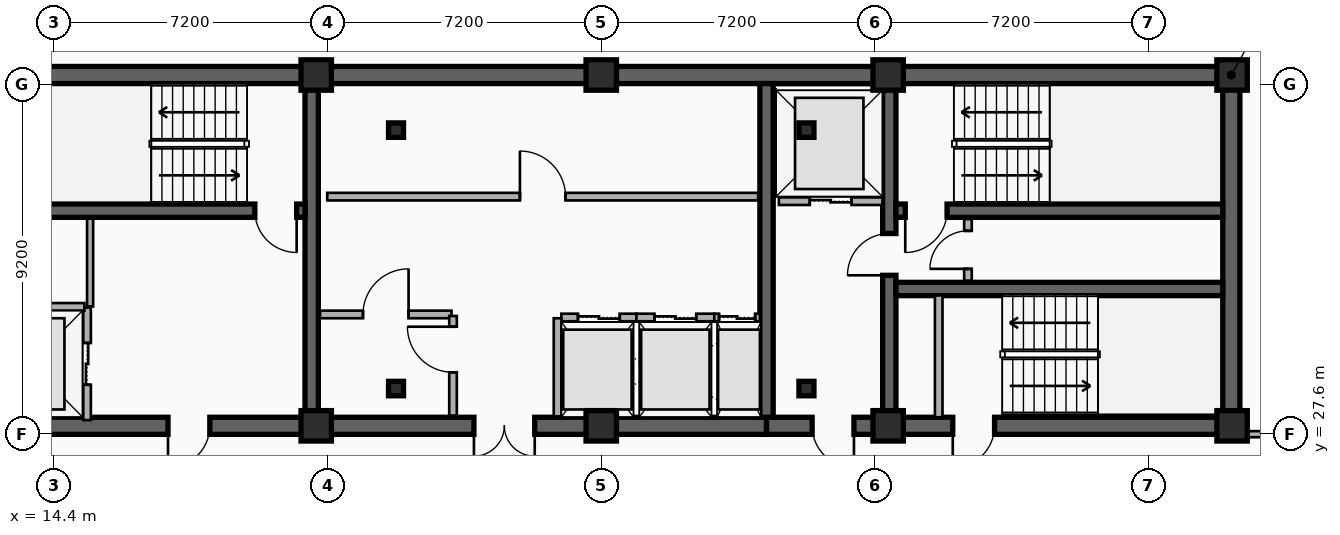
"""IFC4 building model, lengths in metres.
Left out: names, types, materials, properties, quantities, classifications, styles, units other than length and angle.
Written with IfcOpenShell. Run it as: python <this file> out.ifc"""

import sys

from ifc_helpers import new_model, si_unit, direction, frame, frame_2d, origin, origin_2d, place, context, subcontext, project, spatial, rectangle, i_section, extrude, element, fill, save


model = new_model("IFC4")
c1 = context("Model", 3, precision=1e-05, world=origin(), true_north=direction((0.0, 1.0)))
c2 = subcontext(c1, "Body", "Model", "MODEL_VIEW")
j1 = project(units=[si_unit("LENGTHUNIT", "METRE"), si_unit("PLANEANGLEUNIT", "RADIAN")], contexts=[c1])
p1 = place(None, origin())
s1 = spatial("IfcSite", under=j1, at=p1, CompositionType="ELEMENT")
p2 = place(p1, origin())
s2 = spatial("IfcBuilding", under=s1, at=p2, CompositionType="ELEMENT")
p3 = place(p2, frame((0.0, 0.0, 247.3)))
s3 = spatial("IfcBuildingStorey", under=s2, at=p3, CompositionType="ELEMENT", Elevation=247.3)
p4 = place(p3, frame((12.15, 37.05, 0.0), z_axis=(0.0, 0.0, 1.0), x_axis=(1.0, 0.0, 0.0)))
e1 = element("IfcWall", 1, at=p4, inside=s3, PredefinedType="SHEAR", context=c2, shape_type="SweptSolid", body=[
    extrude(rectangle(XDim=33.23, YDim=0.45, at=frame_2d((16.615, 0.0))), origin(), (0.0, 0.0, 1.0), 3.7),
])
p5 = place(p3, frame((21.18, 27.82, 0.0), z_axis=(0.0, 0.0, 1.0), x_axis=(-1.0, 0.0, 0.0)))
e2 = element("IfcWall", 2, at=p5, inside=s3, PredefinedType="SHEAR", context=c2, shape_type="SweptSolid", body=[
    extrude(rectangle(XDim=9.03, YDim=0.45, at=frame_2d((4.515, 0.0))), origin(), (0.0, 0.0, 1.0), 3.7),
])
p6 = place(p5, frame((2.68, 0.0, 0.0)))
e3 = element("IfcOpeningElement", 3, at=p6, cuts=e2, PredefinedType="OPENING", context=c2, shape_type="SweptSolid", body=[
    extrude(rectangle(XDim=1.1, YDim=2.15, at=frame_2d((0.55, 1.075))), frame((0.0, 0.235, 0.0), z_axis=(0.0, -1.0, 0.0), x_axis=(1.0, 0.0, 0.0)), (0.0, 0.0, 1.0), 0.47),
])
p7 = place(p3, frame((33.15, 27.82, 0.0), z_axis=(0.0, 0.0, 1.0), x_axis=(-1.0, 0.0, 0.0)))
e4 = element("IfcWall", 4, at=p7, inside=s3, PredefinedType="SHEAR", context=c2, shape_type="SweptSolid", body=[
    extrude(rectangle(XDim=11.97, YDim=0.45, at=frame_2d((5.985, 0.0))), origin(), (0.0, 0.0, 1.0), 3.7),
])
p8 = place(p7, frame((6.1, 0.0, 0.0)))
e5 = element("IfcOpeningElement", 5, at=p8, cuts=e4, PredefinedType="OPENING", context=c2, shape_type="SweptSolid", body=[
    extrude(rectangle(XDim=1.6, YDim=2.2, at=frame_2d((0.8, 1.1))), frame((0.0, 0.235, 0.0), z_axis=(0.0, -1.0, 0.0), x_axis=(1.0, 0.0, 0.0)), (0.0, 0.0, 1.0), 0.47),
])
p9 = place(p3, frame((45.38, 27.82, 0.0), z_axis=(0.0, 0.0, 1.0), x_axis=(-1.0, 0.0, 0.0)))
e6 = element("IfcWall", 6, at=p9, inside=s3, PredefinedType="SHEAR", context=c2, shape_type="SweptSolid", body=[
    extrude(rectangle(XDim=12.23, YDim=0.45, at=frame_2d((6.115, 0.0))), origin(), (0.0, 0.0, 1.0), 3.7),
])
p10 = place(p9, frame((9.93, 0.0, 0.0)))
e7 = element("IfcOpeningElement", 7, at=p10, cuts=e6, PredefinedType="OPENING", context=c2, shape_type="SweptSolid", body=[
    extrude(rectangle(XDim=1.1, YDim=2.15, at=frame_2d((0.55, 1.075))), frame((0.0, 0.235, 0.0), z_axis=(0.0, -1.0, 0.0), x_axis=(1.0, 0.0, 0.0)), (0.0, 0.0, 1.0), 0.47),
])
p11 = place(p9, frame((6.23, 0.0, 0.0)))
e8 = element("IfcOpeningElement", 8, at=p11, cuts=e6, PredefinedType="OPENING", context=c2, shape_type="SweptSolid", body=[
    extrude(rectangle(XDim=1.1, YDim=2.15, at=frame_2d((0.55, 1.075))), frame((0.0, 0.235, 0.0), z_axis=(0.0, -1.0, 0.0), x_axis=(1.0, 0.0, 0.0)), (0.0, 0.0, 1.0), 0.47),
])
p12 = place(p3, frame((45.38, 28.045, 0.0), z_axis=(0.0, 0.0, 1.0), x_axis=(0.0, 1.0, 0.0)))
e9 = element("IfcWall", 9, at=p12, inside=s3, PredefinedType="SHEAR", context=c2, shape_type="SweptSolid", body=[
    extrude(rectangle(XDim=8.78, YDim=0.45, at=frame_2d((4.39, 0.0))), origin(), (0.0, 0.0, 1.0), 3.7),
])
for number, where, z_axis, x_axis in (
    (10, (21.18, 28.045, 0.0), (0.0, 0.0, 1.0), (0.0, 1.0, 0.0)),
    (11, (33.15, 28.045, 0.0), (0.0, 0.0, 1.0), (0.0, 1.0, 0.0)),
):
    element("IfcWall", number, at=place(p3, frame(where, z_axis=z_axis, x_axis=x_axis)), inside=s3, PredefinedType="SHEAR", context=c2, shape_type="SweptSolid", body=[
        extrude(rectangle(XDim=8.78, YDim=0.35, at=frame_2d((4.39, 0.0))), origin(), (0.0, 0.0, 1.0), 3.7),
    ])
p13 = place(p3, frame((36.38, 28.045, 0.0), z_axis=(0.0, 0.0, 1.0), x_axis=(0.0, 1.0, 0.0)))
e12 = element("IfcWall", 12, at=p13, inside=s3, PredefinedType="SHEAR", context=c2, shape_type="SweptSolid", body=[
    extrude(rectangle(XDim=8.78, YDim=0.35, at=frame_2d((4.39, 0.0))), origin(), (0.0, 0.0, 1.0), 3.7),
])
p14 = place(p13, frame((3.735, 0.0, 0.0)))
e13 = element("IfcOpeningElement", 13, at=p14, cuts=e12, PredefinedType="OPENING", context=c2, shape_type="SweptSolid", body=[
    extrude(rectangle(XDim=1.1, YDim=2.15, at=frame_2d((0.55, 1.075))), frame((0.0, 0.185, 0.0), z_axis=(0.0, -1.0, 0.0), x_axis=(1.0, 0.0, 0.0)), (0.0, 0.0, 1.0), 0.37),
])
p15 = place(p3, frame((21.005, 33.48, 0.0), z_axis=(0.0, 0.0, 1.0), x_axis=(-1.0, 0.0, 0.0)))
e14 = element("IfcWall", 14, at=p15, inside=s3, PredefinedType="SHEAR", context=c2, shape_type="SweptSolid", body=[
    extrude(rectangle(XDim=8.63, YDim=0.35, at=frame_2d((4.315, 0.0))), origin(), (0.0, 0.0, 1.0), 3.7),
])
p16 = place(p15, frame((0.22, 0.0, 0.0)))
e15 = element("IfcOpeningElement", 15, at=p16, cuts=e14, PredefinedType="OPENING", context=c2, shape_type="SweptSolid", body=[
    extrude(rectangle(XDim=1.1, YDim=2.15, at=frame_2d((0.55, 1.075))), frame((0.0, 0.185, 0.0), z_axis=(0.0, -1.0, 0.0), x_axis=(1.0, 0.0, 0.0)), (0.0, 0.0, 1.0), 0.37),
])
p17 = place(p3, frame((45.155, 33.48, 0.0), z_axis=(0.0, 0.0, 1.0), x_axis=(-1.0, 0.0, 0.0)))
e16 = element("IfcWall", 16, at=p17, inside=s3, PredefinedType="SHEAR", context=c2, shape_type="SweptSolid", body=[
    extrude(rectangle(XDim=8.6, YDim=0.35, at=frame_2d((4.3, 0.0))), origin(), (0.0, 0.0, 1.0), 3.7),
])
p18 = place(p17, frame((7.255, 0.0, 0.0)))
e17 = element("IfcOpeningElement", 17, at=p18, cuts=e16, PredefinedType="OPENING", context=c2, shape_type="SweptSolid", body=[
    extrude(rectangle(XDim=1.1, YDim=2.15, at=frame_2d((0.55, 1.075))), frame((0.0, 0.185, 0.0), z_axis=(0.0, -1.0, 0.0), x_axis=(1.0, 0.0, 0.0)), (0.0, 0.0, 1.0), 0.37),
])
p19 = place(p3, frame((36.555, 31.42, 0.0), z_axis=(0.0, 0.0, 1.0), x_axis=(1.0, 0.0, 0.0)))
e18 = element("IfcWall", 18, at=p19, inside=s3, PredefinedType="SHEAR", context=c2, shape_type="SweptSolid", body=[
    extrude(rectangle(XDim=8.6, YDim=0.35, at=frame_2d((4.3, 0.0))), origin(), (0.0, 0.0, 1.0), 3.7),
])
for number, where, z_axis, x_axis in (
    (19, (23.4, 28.8, 0.0), (0.0, 0.0, 1.0), (1.0, 0.0, 0.0)),
    (20, (34.2, 28.8, 0.0), (0.0, 0.0, 1.0), (1.0, 0.0, 0.0)),
    (21, (34.2, 35.6, 0.0), (0.0, 0.0, 1.0), (1.0, 0.0, 0.0)),
    (22, (23.4, 35.6, 0.0), (0.0, 0.0, 1.0), (1.0, 0.0, 0.0)),
):
    element("IfcColumn", number, at=place(p3, frame(where, z_axis=z_axis, x_axis=x_axis)), inside=s3, PredefinedType="COLUMN", context=c2, shape_type="SweptSolid", body=[
        extrude(i_section(OverallWidth=0.395, OverallDepth=0.38, WebThickness=0.019, FlangeThickness=0.03, FilletRadius=0.015, at=origin_2d()), origin(), (0.0, 0.0, 1.0), 3.7),
    ])
for number, where, z_axis, x_axis in (
    (23, (21.3, 27.82, 0.0), (0.0, 0.0, 1.0), (1.0, 0.0, 0.0)),
    (24, (21.3, 37.05, 0.0), (0.0, 0.0, 1.0), (1.0, 0.0, 0.0)),
    (25, (28.8, 27.82, 0.0), (0.0, 0.0, 1.0), (1.0, 0.0, 0.0)),
    (26, (28.8, 37.05, 0.0), (0.0, 0.0, 1.0), (1.0, 0.0, 0.0)),
    (27, (36.35, 27.82, 0.0), (0.0, 0.0, 1.0), (1.0, 0.0, 0.0)),
    (28, (36.35, 37.05, 0.0), (0.0, 0.0, 1.0), (1.0, 0.0, 0.0)),
    (29, (45.4, 27.82, 0.0), (0.0, 0.0, 1.0), (1.0, 0.0, 0.0)),
    (30, (45.4, 37.05, 0.0), (0.0, 0.0, 1.0), (1.0, 0.0, 0.0)),
):
    element("IfcColumn", number, at=place(p3, frame(where, z_axis=z_axis, x_axis=x_axis)), inside=s3, PredefinedType="COLUMN", context=c2, shape_type="SweptSolid", body=[
        extrude(rectangle(XDim=0.8, YDim=0.8, at=origin_2d()), origin(), (0.0, 0.0, 1.0), 3.7),
    ])
p20 = place(p3, frame((15.27, 27.97, 0.0), z_axis=(0.0, 0.0, 1.0), x_axis=(0.0, 1.0, 0.0)))
e31 = element("IfcWall", 31, at=p20, inside=s3, PredefinedType="PARTITIONING", context=c2, shape_type="SweptSolid", body=[
    extrude(rectangle(XDim=2.96, YDim=0.2, at=frame_2d((1.48, 0.0))), origin(), (0.0, 0.0, 1.0), 2.49),
])
p21 = place(p20, frame((0.93, 0.0, 0.0)))
e32 = element("IfcOpeningElement", 32, at=p21, cuts=e31, PredefinedType="OPENING", context=c2, shape_type="SweptSolid", body=[
    extrude(rectangle(XDim=1.1, YDim=2.15, at=frame_2d((0.55, 1.075))), frame((0.0, 0.11, 0.0), z_axis=(0.0, -1.0, 0.0), x_axis=(1.0, 0.0, 0.0)), (0.0, 0.0, 1.0), 0.22),
])
p22 = place(p3, frame((12.45, 30.95, 0.0), z_axis=(0.0, 0.0, 1.0), x_axis=(1.0, 0.0, 0.0)))
e33 = element("IfcWall", 33, at=p22, inside=s3, PredefinedType="PARTITIONING", context=c2, shape_type="SweptSolid", body=[
    extrude(rectangle(XDim=2.75, YDim=0.2, at=frame_2d((1.375, 0.0))), origin(), (0.0, 0.0, 1.0), 2.49),
])
p23 = place(p3, frame((33.475, 33.73, 0.0), z_axis=(0.0, 0.0, 1.0), x_axis=(1.0, 0.0, 0.0)))
e34 = element("IfcWall", 34, at=p23, inside=s3, PredefinedType="PARTITIONING", context=c2, shape_type="SweptSolid", body=[
    extrude(rectangle(XDim=2.725, YDim=0.2, at=frame_2d((1.362, 0.0))), origin(), (0.0, 0.0, 1.0), 2.49),
])
p24 = place(p23, frame((0.812, 0.0, 0.0)))
e35 = element("IfcOpeningElement", 35, at=p24, cuts=e34, PredefinedType="OPENING", context=c2, shape_type="SweptSolid", body=[
    extrude(rectangle(XDim=1.1, YDim=2.15, at=frame_2d((0.55, 1.075))), frame((0.0, 0.11, 0.0), z_axis=(0.0, -1.0, 0.0), x_axis=(1.0, 0.0, 0.0)), (0.0, 0.0, 1.0), 0.22),
])
p25 = place(p3, frame((27.75, 30.67, 0.0), z_axis=(0.0, 0.0, 1.0), x_axis=(1.0, 0.0, 0.0)))
e36 = element("IfcWall", 36, at=p25, inside=s3, PredefinedType="PARTITIONING", context=c2, shape_type="SweptSolid", body=[
    extrude(rectangle(XDim=1.975, YDim=0.2, at=frame_2d((0.988, 0.0))), origin(), (0.0, 0.0, 1.0), 2.49),
])
p26 = place(p25, frame((0.438, 0.0, 0.0)))
e37 = element("IfcOpeningElement", 37, at=p26, cuts=e36, PredefinedType="OPENING", context=c2, shape_type="SweptSolid", body=[
    extrude(rectangle(XDim=1.1, YDim=2.15, at=frame_2d((0.55, 1.075))), frame((0.0, 0.11, 0.0), z_axis=(0.0, -1.0, 0.0), x_axis=(1.0, 0.0, 0.0)), (0.0, 0.0, 1.0), 0.22),
])
p27 = place(p3, frame((27.65, 28.07, 0.0), z_axis=(0.0, 0.0, 1.0), x_axis=(0.0, 1.0, 0.0)))
e38 = element("IfcWall", 38, at=p27, inside=s3, PredefinedType="PARTITIONING", context=c2, shape_type="SweptSolid", body=[
    extrude(rectangle(XDim=2.58, YDim=0.2, at=frame_2d((1.29, 0.0))), origin(), (0.0, 0.0, 1.0), 2.49),
])
p28 = place(p3, frame((29.725, 30.67, 0.0), z_axis=(0.0, 0.0, 1.0), x_axis=(1.0, 0.0, 0.0)))
e39 = element("IfcWall", 39, at=p28, inside=s3, PredefinedType="PARTITIONING", context=c2, shape_type="SweptSolid", body=[
    extrude(rectangle(XDim=2.05, YDim=0.2, at=frame_2d((1.025, 0.0))), origin(), (0.0, 0.0, 1.0), 2.8),
])
p29 = place(p28, frame((0.475, 0.0, 0.0)))
e40 = element("IfcOpeningElement", 40, at=p29, cuts=e39, PredefinedType="OPENING", context=c2, shape_type="SweptSolid", body=[
    extrude(rectangle(XDim=1.1, YDim=2.15, at=frame_2d((0.55, 1.075))), frame((0.0, 0.11, 0.0), z_axis=(0.0, -1.0, 0.0), x_axis=(1.0, 0.0, 0.0)), (0.0, 0.0, 1.0), 0.22),
])
p30 = place(p3, frame((31.775, 30.67, 0.0), z_axis=(0.0, 0.0, 1.0), x_axis=(1.0, 0.0, 0.0)))
e41 = element("IfcWall", 41, at=p30, inside=s3, PredefinedType="PARTITIONING", context=c2, shape_type="SweptSolid", body=[
    extrude(rectangle(XDim=1.2, YDim=0.2, at=frame_2d((0.6, 0.0))), origin(), (0.0, 0.0, 1.0), 2.8),
])
p31 = place(p30, frame((0.125, 0.0, 0.0)))
e42 = element("IfcOpeningElement", 42, at=p31, cuts=e41, PredefinedType="OPENING", context=c2, shape_type="SweptSolid", body=[
    extrude(rectangle(XDim=0.95, YDim=2.15, at=frame_2d((0.475, 1.075))), frame((0.0, 0.11, 0.0), z_axis=(0.0, -1.0, 0.0), x_axis=(1.0, 0.0, 0.0)), (0.0, 0.0, 1.0), 0.22),
])
p32 = place(p3, frame((37.68, 28.045, 0.0), z_axis=(0.0, 0.0, 1.0), x_axis=(0.0, 1.0, 0.0)))
e43 = element("IfcWall", 43, at=p32, inside=s3, PredefinedType="PARTITIONING", context=c2, shape_type="SweptSolid", body=[
    extrude(rectangle(XDim=3.205, YDim=0.2, at=frame_2d((1.603, 0.0))), origin(), (0.0, 0.0, 1.0), 2.8),
])
p33 = place(p3, frame((38.45, 31.64, 0.0), z_axis=(0.0, 0.0, 1.0), x_axis=(0.0, 1.0, 0.0)))
e44 = element("IfcWall", 44, at=p33, inside=s3, PredefinedType="PARTITIONING", context=c2, shape_type="SweptSolid", body=[
    extrude(rectangle(XDim=1.62, YDim=0.2, at=frame_2d((0.81, 0.0))), origin(), (0.0, 0.0, 1.0), 3.42),
])
p34 = place(p33, frame((0.31, 0.0, 0.0)))
e45 = element("IfcOpeningElement", 45, at=p34, cuts=e44, PredefinedType="OPENING", context=c2, shape_type="SweptSolid", body=[
    extrude(rectangle(XDim=1.0, YDim=2.15, at=frame_2d((0.5, 1.075))), frame((0.0, 0.11, 0.0), z_axis=(0.0, -1.0, 0.0), x_axis=(1.0, 0.0, 0.0)), (0.0, 0.0, 1.0), 0.22),
])
p35 = place(p3, frame((21.4, 30.75, 0.0), z_axis=(0.0, 0.0, 1.0), x_axis=(1.0, 0.0, 0.0)))
e46 = element("IfcWall", 46, at=p35, inside=s3, PredefinedType="PARTITIONING", context=c2, shape_type="SweptSolid", body=[
    extrude(rectangle(XDim=3.46, YDim=0.2, at=frame_2d((1.73, 0.0))), origin(), (0.0, 0.0, 1.0), 2.49),
])
p36 = place(p35, frame((1.13, 0.0, 0.0)))
e47 = element("IfcOpeningElement", 47, at=p36, cuts=e46, PredefinedType="OPENING", context=c2, shape_type="SweptSolid", body=[
    extrude(rectangle(XDim=1.2, YDim=2.15, at=frame_2d((0.6, 1.075))), frame((0.0, 0.11, 0.0), z_axis=(0.0, -1.0, 0.0), x_axis=(1.0, 0.0, 0.0)), (0.0, 0.0, 1.0), 0.22),
])
p37 = place(p3, frame((21.59, 33.85, 0.0), z_axis=(0.0, 0.0, 1.0), x_axis=(1.0, 0.0, 0.0)))
e48 = element("IfcWall", 48, at=p37, inside=s3, PredefinedType="PARTITIONING", context=c2, shape_type="SweptSolid", body=[
    extrude(rectangle(XDim=11.34, YDim=0.2, at=frame_2d((5.67, 0.0))), origin(), (0.0, 0.0, 1.0), 2.49),
])
p38 = place(p37, frame((5.07, 0.0, 0.0)))
e49 = element("IfcOpeningElement", 49, at=p38, cuts=e48, PredefinedType="OPENING", context=c2, shape_type="SweptSolid", body=[
    extrude(rectangle(XDim=1.2, YDim=2.15, at=frame_2d((0.6, 1.075))), frame((0.0, 0.11, 0.0), z_axis=(0.0, -1.0, 0.0), x_axis=(1.0, 0.0, 0.0)), (0.0, 0.0, 1.0), 0.22),
])
p39 = place(p3, frame((24.9, 28.09, 0.0), z_axis=(0.0, 0.0, 1.0), x_axis=(0.0, 1.0, 0.0)))
e50 = element("IfcWall", 50, at=p39, inside=s3, PredefinedType="PARTITIONING", context=c2, shape_type="SweptSolid", body=[
    extrude(rectangle(XDim=2.62, YDim=0.2, at=frame_2d((1.31, 0.0))), origin(), (0.0, 0.0, 1.0), 2.8),
])
p40 = place(p39, frame((1.137, 0.0, 0.0)))
e51 = element("IfcOpeningElement", 51, at=p40, cuts=e50, PredefinedType="OPENING", context=c2, shape_type="SweptSolid", body=[
    extrude(rectangle(XDim=1.2, YDim=2.15, at=frame_2d((0.6, 1.075))), frame((0.0, 0.11, 0.0), z_axis=(0.0, -1.0, 0.0), x_axis=(1.0, 0.0, 0.0)), (0.0, 0.0, 1.0), 0.22),
])
p41 = place(p3, frame((15.35, 30.96, 0.0), z_axis=(0.0, 0.0, 1.0), x_axis=(0.0, 1.0, 0.0)))
e52 = element("IfcWall", 52, at=p41, inside=s3, PredefinedType="PARTITIONING", context=c2, shape_type="SweptSolid", body=[
    extrude(rectangle(XDim=2.31, YDim=0.16, at=frame_2d((1.155, 0.0))), origin(), (0.0, 0.0, 1.0), 3.42),
])
p42 = place(p3, frame((45.41, 27.6, 0.0), z_axis=(0.0, 0.0, 1.0), x_axis=(1.0, 0.0, 0.0)))
e53 = element("IfcWall", 53, at=p42, inside=s3, PredefinedType="PARTITIONING", context=c2, shape_type="SweptSolid", body=[
    extrude(rectangle(XDim=0.91, YDim=0.16, at=frame_2d((0.455, 0.0))), origin(), (0.0, 0.0, 1.0), 2.49),
])
p43 = place(p21, origin())
e54 = element("IfcDoor", 54, at=p43, inside=s3, OperationType="DOUBLE_DOOR_SLIDING", PredefinedType="DOOR", context=c2, shape_type="SweptSolid", body=[
    extrude(rectangle(XDim=1.1, YDim=2.15, at=frame_2d((0.55, 1.075))), frame((0.0, 0.025, 0.0), z_axis=(0.0, -1.0, 0.0), x_axis=(1.0, 0.0, 0.0)), (0.0, 0.0, 1.0), 0.05),
])
fill(e32, e54)
p44 = place(p24, origin())
e55 = element("IfcDoor", 55, at=p44, inside=s3, OperationType="DOUBLE_DOOR_SLIDING", PredefinedType="DOOR", context=c2, shape_type="SweptSolid", body=[
    extrude(rectangle(XDim=1.1, YDim=2.15, at=frame_2d((0.55, 1.075))), frame((0.0, 0.025, 0.0), z_axis=(0.0, -1.0, 0.0), x_axis=(1.0, 0.0, 0.0)), (0.0, 0.0, 1.0), 0.05),
])
fill(e35, e55)
p45 = place(p26, origin())
e56 = element("IfcDoor", 56, at=p45, inside=s3, OperationType="DOUBLE_DOOR_SLIDING", PredefinedType="DOOR", context=c2, shape_type="SweptSolid", body=[
    extrude(rectangle(XDim=1.1, YDim=2.15, at=frame_2d((0.55, 1.075))), frame((0.0, 0.025, 0.0), z_axis=(0.0, -1.0, 0.0), x_axis=(1.0, 0.0, 0.0)), (0.0, 0.0, 1.0), 0.05),
])
fill(e37, e56)
p46 = place(p29, origin())
e57 = element("IfcDoor", 57, at=p46, inside=s3, OperationType="DOUBLE_DOOR_SLIDING", PredefinedType="DOOR", context=c2, shape_type="SweptSolid", body=[
    extrude(rectangle(XDim=1.1, YDim=2.15, at=frame_2d((0.55, 1.075))), frame((0.0, 0.025, 0.0), z_axis=(0.0, -1.0, 0.0), x_axis=(1.0, 0.0, 0.0)), (0.0, 0.0, 1.0), 0.05),
])
fill(e40, e57)
p47 = place(p31, origin())
e58 = element("IfcDoor", 58, at=p47, inside=s3, OperationType="DOUBLE_DOOR_SLIDING", PredefinedType="DOOR", context=c2, shape_type="SweptSolid", body=[
    extrude(rectangle(XDim=0.95, YDim=2.15, at=frame_2d((0.475, 1.075))), frame((0.0, 0.025, 0.0), z_axis=(0.0, -1.0, 0.0), x_axis=(1.0, 0.0, 0.0)), (0.0, 0.0, 1.0), 0.05),
])
fill(e42, e58)
p48 = place(p16, origin())
e59 = element("IfcDoor", 59, at=p48, inside=s3, OperationType="SINGLE_SWING_LEFT", PredefinedType="DOOR", context=c2, shape_type="SweptSolid", body=[
    extrude(rectangle(XDim=1.1, YDim=2.15, at=frame_2d((0.55, 1.075))), frame((0.0, 0.025, 0.0), z_axis=(0.0, -1.0, 0.0), x_axis=(1.0, 0.0, 0.0)), (0.0, 0.0, 1.0), 0.05),
])
fill(e15, e59)
p49 = place(p6, origin())
e60 = element("IfcDoor", 60, at=p49, inside=s3, OperationType="SINGLE_SWING_RIGHT", PredefinedType="DOOR", context=c2, shape_type="SweptSolid", body=[
    extrude(rectangle(XDim=1.1, YDim=2.15, at=frame_2d((0.55, 1.075))), frame((0.0, 0.025, 0.0), z_axis=(0.0, -1.0, 0.0), x_axis=(1.0, 0.0, 0.0)), (0.0, 0.0, 1.0), 0.05),
])
fill(e3, e60)
p50 = place(p18, origin())
e61 = element("IfcDoor", 61, at=p50, inside=s3, OperationType="SINGLE_SWING_RIGHT", PredefinedType="DOOR", context=c2, shape_type="SweptSolid", body=[
    extrude(rectangle(XDim=1.1, YDim=2.15, at=frame_2d((0.55, 1.075))), frame((0.0, 0.025, 0.0), z_axis=(0.0, -1.0, 0.0), x_axis=(1.0, 0.0, 0.0)), (0.0, 0.0, 1.0), 0.05),
])
fill(e17, e61)
p51 = place(p14, origin())
e62 = element("IfcDoor", 62, at=p51, inside=s3, OperationType="SINGLE_SWING_LEFT", PredefinedType="DOOR", context=c2, shape_type="SweptSolid", body=[
    extrude(rectangle(XDim=1.1, YDim=2.15, at=frame_2d((0.55, 1.075))), frame((0.0, 0.025, 0.0), z_axis=(0.0, -1.0, 0.0), x_axis=(1.0, 0.0, 0.0)), (0.0, 0.0, 1.0), 0.05),
])
fill(e13, e62)
p52 = place(p10, origin())
e63 = element("IfcDoor", 63, at=p52, inside=s3, OperationType="SINGLE_SWING_LEFT", PredefinedType="DOOR", context=c2, shape_type="SweptSolid", body=[
    extrude(rectangle(XDim=1.1, YDim=2.15, at=frame_2d((0.55, 1.075))), frame((0.0, 0.025, 0.0), z_axis=(0.0, -1.0, 0.0), x_axis=(1.0, 0.0, 0.0)), (0.0, 0.0, 1.0), 0.05),
])
fill(e7, e63)
p53 = place(p11, origin())
e64 = element("IfcDoor", 64, at=p53, inside=s3, OperationType="SINGLE_SWING_RIGHT", PredefinedType="DOOR", context=c2, shape_type="SweptSolid", body=[
    extrude(rectangle(XDim=1.1, YDim=2.15, at=frame_2d((0.55, 1.075))), frame((0.0, 0.025, 0.0), z_axis=(0.0, -1.0, 0.0), x_axis=(1.0, 0.0, 0.0)), (0.0, 0.0, 1.0), 0.05),
])
fill(e8, e64)
p54 = place(p8, origin())
e65 = element("IfcDoor", 65, at=p54, inside=s3, OperationType="SINGLE_SWING_LEFT", PredefinedType="DOOR", context=c2, shape_type="SweptSolid", body=[
    extrude(rectangle(XDim=1.6, YDim=2.2, at=frame_2d((0.8, 1.1))), frame((0.0, 0.025, 0.0), z_axis=(0.0, -1.0, 0.0), x_axis=(1.0, 0.0, 0.0)), (0.0, 0.0, 1.0), 0.05),
])
fill(e5, e65)
p55 = place(p34, origin())
e66 = element("IfcDoor", 66, at=p55, inside=s3, OperationType="SINGLE_SWING_LEFT", PredefinedType="DOOR", context=c2, shape_type="SweptSolid", body=[
    extrude(rectangle(XDim=1.0, YDim=2.15, at=frame_2d((0.5, 1.075))), frame((0.0, 0.025, 0.0), z_axis=(0.0, -1.0, 0.0), x_axis=(1.0, 0.0, 0.0)), (0.0, 0.0, 1.0), 0.05),
])
fill(e45, e66)
p56 = place(p36, origin())
e67 = element("IfcDoor", 67, at=p56, inside=s3, OperationType="SINGLE_SWING_RIGHT", PredefinedType="DOOR", context=c2, shape_type="SweptSolid", body=[
    extrude(rectangle(XDim=1.2, YDim=2.15, at=frame_2d((0.6, 1.075))), frame((0.0, 0.025, 0.0), z_axis=(0.0, -1.0, 0.0), x_axis=(1.0, 0.0, 0.0)), (0.0, 0.0, 1.0), 0.05),
])
fill(e47, e67)
p57 = place(p38, origin())
e68 = element("IfcDoor", 68, at=p57, inside=s3, OperationType="SINGLE_SWING_LEFT", PredefinedType="DOOR", context=c2, shape_type="SweptSolid", body=[
    extrude(rectangle(XDim=1.2, YDim=2.15, at=frame_2d((0.6, 1.075))), frame((0.0, 0.025, 0.0), z_axis=(0.0, -1.0, 0.0), x_axis=(1.0, 0.0, 0.0)), (0.0, 0.0, 1.0), 0.05),
])
fill(e49, e68)
p58 = place(p40, origin())
e69 = element("IfcDoor", 69, at=p58, inside=s3, OperationType="SINGLE_SWING_RIGHT", PredefinedType="DOOR", context=c2, shape_type="SweptSolid", body=[
    extrude(rectangle(XDim=1.2, YDim=2.15, at=frame_2d((0.6, 1.075))), frame((0.0, 0.025, 0.0), z_axis=(0.0, -1.0, 0.0), x_axis=(1.0, 0.0, 0.0)), (0.0, 0.0, 1.0), 0.05),
])
fill(e51, e69)
save(model, sys.argv[1])
